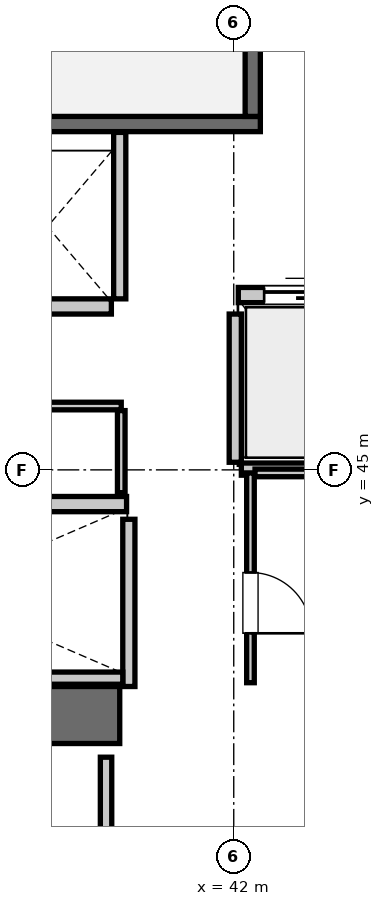
"""IFC4 building model, lengths in metres.
Left out: names, types, materials, properties, quantities, classifications, styles, units other than length and angle.
Written with IfcOpenShell. Run it as: python <this file> out.ifc"""

import sys

from ifc_helpers import new_model, si_unit, direction, frame, frame_2d, origin, place, context, subcontext, project, spatial, rectangle, extrude, element, fill, save


model = new_model("IFC4")
c1 = context("Model", 3, precision=1e-05, world=origin(), true_north=direction((0.0, 1.0)))
c2 = subcontext(c1, "Body", "Model", "MODEL_VIEW")
j1 = project(units=[si_unit("LENGTHUNIT", "METRE"), si_unit("PLANEANGLEUNIT", "RADIAN")], contexts=[c1])
p1 = place(None, origin())
s1 = spatial("IfcSite", under=j1, at=p1, CompositionType="ELEMENT")
p2 = place(p1, origin())
s2 = spatial("IfcBuilding", under=s1, at=p2, CompositionType="ELEMENT")
p3 = place(p2, frame((0.0, 0.0, 135.1)))
s3 = spatial("IfcBuildingStorey", under=s2, at=p3, CompositionType="ELEMENT", Elevation=135.1)
p4 = place(p3, frame((35.1, 41.775, 0.0), z_axis=(0.0, 0.0, 1.0), x_axis=(1.0, 0.0, 0.0)))
e1 = element("IfcWall", 1, at=p4, inside=s3, PredefinedType="SHEAR", context=c2, shape_type="SweptSolid", body=[
    extrude(rectangle(XDim=5.4, YDim=0.75, at=frame_2d((2.7, 0.0))), origin(), (0.0, 0.0, 1.0), 3.85),
])
p5 = place(p3, frame((33.25, 49.55, 0.0), z_axis=(0.0, 0.0, 1.0), x_axis=(1.0, 0.0, 0.0)))
e2 = element("IfcWall", 2, at=p5, inside=s3, PredefinedType="SOLIDWALL", context=c2, shape_type="SweptSolid", body=[
    extrude(rectangle(XDim=9.1, YDim=0.2, at=frame_2d((4.55, 0.0))), origin(), (0.0, 0.0, 1.0), 3.61),
])
p6 = place(p3, frame((42.25, 49.65, 0.0), z_axis=(0.0, 0.0, 1.0), x_axis=(0.0, 1.0, 0.0)))
e3 = element("IfcWall", 3, at=p6, inside=s3, PredefinedType="SOLIDWALL", context=c2, shape_type="SweptSolid", body=[
    extrude(rectangle(XDim=3.6, YDim=0.2, at=frame_2d((1.8, 0.0))), origin(), (0.0, 0.0, 1.0), 3.61),
])
p7 = place(p3, frame((42.06, 47.3, 0.0), z_axis=(0.0, 0.0, 1.0), x_axis=(1.0, 0.0, 0.0)))
e4 = element("IfcWall", 4, at=p7, inside=s3, PredefinedType="SOLIDWALL", context=c2, shape_type="SweptSolid", body=[
    extrude(rectangle(XDim=1.68, YDim=0.2, at=frame_2d((0.84, 0.0))), origin(), (0.0, 0.0, 1.0), 3.61),
])
p8 = place(p7, frame((0.34, 0.0, 0.0)))
e5 = element("IfcOpeningElement", 5, at=p8, cuts=e4, PredefinedType="OPENING", context=c2, shape_type="SweptSolid", body=[
    extrude(rectangle(XDim=1.0, YDim=2.15, at=frame_2d((0.5, 1.075))), frame((0.0, 0.11, 0.0), z_axis=(0.0, -1.0, 0.0), x_axis=(1.0, 0.0, 0.0)), (0.0, 0.0, 1.0), 0.22),
])
p9 = place(p3, frame((38.91, 44.55, 0.0), z_axis=(0.0, 0.0, 1.0), x_axis=(1.0, 0.0, 0.0)))
e6 = element("IfcWall", 6, at=p9, inside=s3, PredefinedType="SOLIDWALL", context=c2, shape_type="SweptSolid", body=[
    extrude(rectangle(XDim=1.68, YDim=0.2, at=frame_2d((0.84, 0.0))), origin(), (0.0, 0.0, 1.0), 3.61),
])
p10 = place(p3, frame((38.71, 47.15, 0.0), z_axis=(0.0, 0.0, 1.0), x_axis=(1.0, 0.0, 0.0)))
e7 = element("IfcWall", 7, at=p10, inside=s3, PredefinedType="SOLIDWALL", context=c2, shape_type="SweptSolid", body=[
    extrude(rectangle(XDim=1.68, YDim=0.2, at=frame_2d((0.84, 0.0))), origin(), (0.0, 0.0, 1.0), 3.61),
])
p11 = place(p3, frame((42.02, 45.1, 0.0), z_axis=(0.0, 0.0, 1.0), x_axis=(0.0, 1.0, 0.0)))
e8 = element("IfcWall", 8, at=p11, inside=s3, PredefinedType="SOLIDWALL", context=c2, shape_type="SweptSolid", body=[
    extrude(rectangle(XDim=1.95, YDim=0.16, at=frame_2d((0.975, 0.0))), origin(), (0.0, 0.0, 1.0), 3.61),
])
p12 = place(p3, frame((42.1, 45.01, 0.0), z_axis=(0.0, 0.0, 1.0), x_axis=(1.0, 0.0, 0.0)))
e9 = element("IfcWall", 9, at=p12, inside=s3, PredefinedType="SOLIDWALL", context=c2, shape_type="SweptSolid", body=[
    extrude(rectangle(XDim=3.45, YDim=0.16, at=frame_2d((1.725, 0.0))), origin(), (0.0, 0.0, 1.0), 3.61),
])
p13 = place(p3, frame((40.62, 42.15, 0.0), z_axis=(0.0, 0.0, 1.0), x_axis=(0.0, 1.0, 0.0)))
e10 = element("IfcWall", 10, at=p13, inside=s3, PredefinedType="SOLIDWALL", context=c2, shape_type="SweptSolid", body=[
    extrude(rectangle(XDim=2.2, YDim=0.16, at=frame_2d((1.1, 0.0))), origin(), (0.0, 0.0, 1.0), 3.61),
])
p14 = place(p3, frame((35.52, 42.26, 0.0), z_axis=(0.0, 0.0, 1.0), x_axis=(1.0, 0.0, 0.0)))
e11 = element("IfcWall", 11, at=p14, inside=s3, PredefinedType="SOLIDWALL", context=c2, shape_type="SweptSolid", body=[
    extrude(rectangle(XDim=5.02, YDim=0.16, at=frame_2d((2.51, 0.0))), origin(), (0.0, 0.0, 1.0), 3.61),
])
p15 = place(p3, frame((40.5, 47.25, 0.0), z_axis=(0.0, 0.0, 1.0), x_axis=(0.0, 1.0, 0.0)))
e12 = element("IfcWall", 12, at=p15, inside=s3, PredefinedType="SOLIDWALL", context=c2, shape_type="SweptSolid", body=[
    extrude(rectangle(XDim=2.19, YDim=0.16, at=frame_2d((1.095, 0.0))), origin(), (0.0, 0.0, 1.0), 3.61),
])
p16 = place(p3, frame((38.02, 45.84, 0.0), z_axis=(0.0, 0.0, 1.0), x_axis=(1.0, 0.0, 0.0)))
e13 = element("IfcWall", 13, at=p16, inside=s3, PredefinedType="PARTITIONING", context=c2, shape_type="SweptSolid", body=[
    extrude(rectangle(XDim=2.5, YDim=0.1, at=frame_2d((1.25, 0.0))), origin(), (0.0, 0.0, 1.0), 3.61),
])
p17 = place(p16, frame((0.75, 0.0, 0.0)))
e14 = element("IfcOpeningElement", 14, at=p17, cuts=e13, PredefinedType="OPENING", context=c2, shape_type="SweptSolid", body=[
    extrude(rectangle(XDim=0.8, YDim=2.05, at=frame_2d((0.4, 1.025))), frame((0.0, 0.06, 0.0), z_axis=(0.0, -1.0, 0.0), x_axis=(1.0, 0.0, 0.0)), (0.0, 0.0, 1.0), 0.12),
])
p18 = place(p3, frame((40.52, 44.7, 0.0), z_axis=(0.0, 0.0, 1.0), x_axis=(0.0, 1.0, 0.0)))
e15 = element("IfcWall", 15, at=p18, inside=s3, PredefinedType="PARTITIONING", context=c2, shape_type="SweptSolid", body=[
    extrude(rectangle(XDim=1.08, YDim=0.1, at=frame_2d((0.54, 0.0))), origin(), (0.0, 0.0, 1.0), 3.61),
])
p19 = place(p3, frame((42.22, 42.2, 0.0), z_axis=(0.0, 0.0, 1.0), x_axis=(0.0, 1.0, 0.0)))
e16 = element("IfcWall", 16, at=p19, inside=s3, PredefinedType="PARTITIONING", context=c2, shape_type="SweptSolid", body=[
    extrude(rectangle(XDim=2.76, YDim=0.1, at=frame_2d((1.38, 0.0))), origin(), (0.0, 0.0, 1.0), 3.61),
])
p20 = place(p19, frame((0.65, 0.0, 0.0)))
e17 = element("IfcOpeningElement", 17, at=p20, cuts=e16, PredefinedType="OPENING", context=c2, shape_type="SweptSolid", body=[
    extrude(rectangle(XDim=0.8, YDim=2.05, at=frame_2d((0.4, 1.025))), frame((0.0, 0.06, 0.0), z_axis=(0.0, -1.0, 0.0), x_axis=(1.0, 0.0, 0.0)), (0.0, 0.0, 1.0), 0.12),
])
p21 = place(p3, frame((42.28, 44.96, 0.0), z_axis=(0.0, 0.0, 1.0), x_axis=(1.0, 0.0, 0.0)))
e18 = element("IfcWall", 18, at=p21, inside=s3, PredefinedType="PARTITIONING", context=c2, shape_type="SweptSolid", body=[
    extrude(rectangle(XDim=1.3, YDim=0.1, at=frame_2d((0.65, 0.0))), origin(), (0.0, 0.0, 1.0), 3.61),
])
p22 = place(p3, frame((40.32, 38.38, 0.0), z_axis=(0.0, 0.0, 1.0), x_axis=(0.0, 1.0, 0.0)))
e19 = element("IfcWall", 19, at=p22, inside=s3, PredefinedType="PARTITIONING", context=c2, shape_type="SweptSolid", body=[
    extrude(rectangle(XDim=2.84, YDim=0.15, at=frame_2d((1.42, 0.0))), origin(), (0.0, 0.0, 1.0), 3.61),
])
p23 = place(p8, origin())
e20 = element("IfcDoor", 20, at=p23, inside=s3, OperationType="SLIDING_TO_LEFT", PredefinedType="DOOR", context=c2, shape_type="SweptSolid", body=[
    extrude(rectangle(XDim=1.0, YDim=2.15, at=frame_2d((0.5, 1.075))), frame((0.0, 0.025, 0.0), z_axis=(0.0, -1.0, 0.0), x_axis=(1.0, 0.0, 0.0)), (0.0, 0.0, 1.0), 0.05),
])
fill(e5, e20)
p24 = place(p20, frame((0.8, 0.0, 0.0), z_axis=(0.0, 0.0, 1.0), x_axis=(-1.0, 0.0, 0.0)))
e21 = element("IfcDoor", 21, at=p24, inside=s3, OperationType="SINGLE_SWING_RIGHT", PredefinedType="DOOR", context=c2, shape_type="SweptSolid", body=[
    extrude(rectangle(XDim=0.8, YDim=2.05, at=frame_2d((0.4, 1.025))), frame((0.0, 0.025, 0.0), z_axis=(0.0, -1.0, 0.0), x_axis=(1.0, 0.0, 0.0)), (0.0, 0.0, 1.0), 0.05),
])
fill(e17, e21)
save(model, sys.argv[1])
